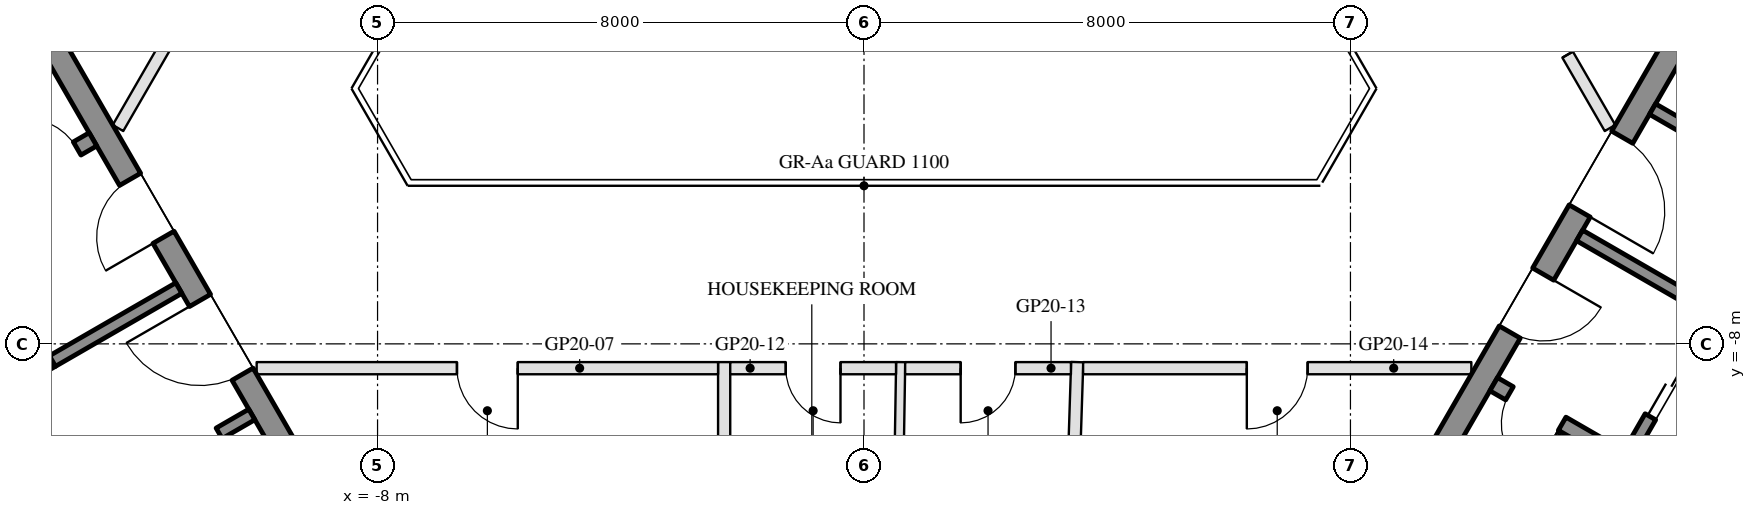
"""IFC4 building model, lengths in metres.
Left out: names, types, materials, properties, quantities, classifications, styles, units other than length and angle.
Written with IfcOpenShell. Run it as: python <this file> out.ifc"""

import sys

from ifc_helpers import new_model, si_unit, direction, frame, frame_2d, origin, place, context, subcontext, project, spatial, rectangle, extrude, element, fill, save


model = new_model("IFC4")
c1 = context("Model", 3, precision=1e-05, world=origin(), true_north=direction((0.0, 1.0)))
c2 = subcontext(c1, "Body", "Model", "MODEL_VIEW")
j1 = project(units=[si_unit("LENGTHUNIT", "METRE"), si_unit("PLANEANGLEUNIT", "RADIAN")], contexts=[c1])
p1 = place(None, origin())
s1 = spatial("IfcSite", under=j1, at=p1, CompositionType="ELEMENT")
p2 = place(p1, origin())
s2 = spatial("IfcBuilding", under=s1, at=p2, CompositionType="ELEMENT")
p3 = place(p2, frame((0.0, 0.0, 209.5)))
s3 = spatial("IfcBuildingStorey", under=s2, at=p3, CompositionType="ELEMENT", Elevation=209.5)
p4 = place(p3, frame((-13.845, -2.22, 0.0), z_axis=(0.0, 0.0, 1.0), x_axis=(0.500004234368, -0.866022959057, 0.0)))
e1 = element("IfcWall", 1, at=p4, inside=s3, PredefinedType="SHEAR", context=c2, shape_type="SweptSolid", body=[
    extrude(rectangle(XDim=10.0, YDim=0.4, at=frame_2d((5.0, 0.0))), origin(), (0.0, 0.0, 1.0), 3.5),
])
p5 = place(p4, frame((3.55, 0.0, 0.0)))
e2 = element("IfcOpeningElement", 2, at=p5, cuts=e1, PredefinedType="OPENING", context=c2, shape_type="SweptSolid", body=[
    extrude(rectangle(XDim=1.1, YDim=2.1, at=frame_2d((0.55, 1.05))), frame((0.0, 0.21, 0.0), z_axis=(0.0, -1.0, 0.0), x_axis=(1.0, 0.0, 0.0)), (0.0, 0.0, 1.0), 0.42),
])
p6 = place(p4, frame((5.85, 0.0, 0.0)))
e3 = element("IfcOpeningElement", 3, at=p6, cuts=e1, PredefinedType="OPENING", context=c2, shape_type="SweptSolid", body=[
    extrude(rectangle(XDim=1.4, YDim=2.1, at=frame_2d((0.7, 1.05))), frame((0.0, 0.21, 0.0), z_axis=(0.0, -1.0, 0.0), x_axis=(1.0, 0.0, 0.0)), (0.0, 0.0, 1.0), 0.42),
])
p7 = place(p3, frame((-12.681, -4.636, 0.0), z_axis=(0.0, 0.0, 1.0), x_axis=(-0.866021702275, -0.500006411147, 0.0)))
e4 = element("IfcWall", 4, at=p7, inside=s3, PredefinedType="SHEAR", context=c2, shape_type="SweptSolid", body=[
    extrude(rectangle(XDim=6.45, YDim=0.25, at=frame_2d((3.225, 0.0))), origin(), (0.0, 0.0, 1.0), 3.5),
])
p8 = place(p7, frame((0.3, 0.0, 0.0)))
e5 = element("IfcOpeningElement", 5, at=p8, cuts=e4, PredefinedType="OPENING", context=c2, shape_type="SweptSolid", body=[
    extrude(rectangle(XDim=1.0, YDim=2.1, at=frame_2d((0.5, 1.05))), frame((0.0, 0.135, 0.0), z_axis=(0.0, -1.0, 0.0), x_axis=(1.0, 0.0, 0.0)), (0.0, 0.0, 1.0), 0.27),
])
p9 = place(p3, frame((-14.783, -5.995, 0.0), z_axis=(0.0, 0.0, 1.0), x_axis=(0.49994636267, -0.866056369097, 0.0)))
e6 = element("IfcWall", 6, at=p9, inside=s3, PredefinedType="SHEAR", context=c2, shape_type="SweptSolid", body=[
    extrude(rectangle(XDim=2.8, YDim=0.2, at=frame_2d((1.4, 0.0))), origin(), (0.0, 0.0, 1.0), 3.5),
])
p10 = place(p9, frame((0.7, 0.0, 0.0)))
e7 = element("IfcOpeningElement", 7, at=p10, cuts=e6, PredefinedType="OPENING", context=c2, shape_type="SweptSolid", body=[
    extrude(rectangle(XDim=1.2, YDim=2.1, at=frame_2d((0.6, 1.05))), frame((0.0, 0.11, 0.0), z_axis=(0.0, -1.0, 0.0), x_axis=(1.0, 0.0, 0.0)), (0.0, 0.0, 1.0), 0.22),
])
p11 = place(p3, frame((-11.268, -7.083, 0.0), z_axis=(0.0, 0.0, 1.0), x_axis=(-0.866050077142, -0.499957262057, 0.0)))
e8 = element("IfcWall", 8, at=p11, inside=s3, PredefinedType="SHEAR", context=c2, shape_type="SweptSolid", body=[
    extrude(rectangle(XDim=2.4, YDim=0.2, at=frame_2d((1.2, 0.0))), origin(), (0.0, 0.0, 1.0), 3.5),
])
p12 = place(p3, frame((-10.068, -9.162, 0.0), z_axis=(0.0, 0.0, 1.0), x_axis=(-0.866032725843, -0.499987317609, 0.0)))
e9 = element("IfcWall", 9, at=p12, inside=s3, PredefinedType="SHEAR", context=c2, shape_type="SweptSolid", body=[
    extrude(rectangle(XDim=10.16, YDim=0.2, at=frame_2d((5.08, 0.0))), origin(), (0.0, 0.0, 1.0), 3.5),
])
p13 = place(p12, frame((0.62, 0.0, 0.0)))
e10 = element("IfcOpeningElement", 10, at=p13, cuts=e9, PredefinedType="OPENING", context=c2, shape_type="SweptSolid", body=[
    extrude(rectangle(XDim=1.1, YDim=2.1, at=frame_2d((0.55, 1.05))), frame((0.0, 0.11, 0.0), z_axis=(0.0, -1.0, 0.0), x_axis=(1.0, 0.0, 0.0)), (0.0, 0.0, 1.0), 0.22),
])
p14 = place(p12, frame((3.16, 0.0, 0.0)))
e11 = element("IfcOpeningElement", 11, at=p14, cuts=e9, PredefinedType="OPENING", context=c2, shape_type="SweptSolid", body=[
    extrude(rectangle(XDim=1.1, YDim=2.1, at=frame_2d((0.55, 1.05))), frame((0.0, 0.11, 0.0), z_axis=(0.0, -1.0, 0.0), x_axis=(1.0, 0.0, 0.0)), (0.0, 0.0, 1.0), 0.22),
])
p15 = place(p12, frame((5.7, 0.0, 0.0)))
e12 = element("IfcOpeningElement", 12, at=p15, cuts=e9, PredefinedType="OPENING", context=c2, shape_type="SweptSolid", body=[
    extrude(rectangle(XDim=1.1, YDim=2.1, at=frame_2d((0.55, 1.05))), frame((0.0, 0.11, 0.0), z_axis=(0.0, -1.0, 0.0), x_axis=(1.0, 0.0, 0.0)), (0.0, 0.0, 1.0), 0.22),
])
p16 = place(p12, frame((8.24, 0.0, 0.0)))
e13 = element("IfcOpeningElement", 13, at=p16, cuts=e9, PredefinedType="OPENING", context=c2, shape_type="SweptSolid", body=[
    extrude(rectangle(XDim=1.1, YDim=2.1, at=frame_2d((0.55, 1.05))), frame((0.0, 0.11, 0.0), z_axis=(0.0, -1.0, 0.0), x_axis=(1.0, 0.0, 0.0)), (0.0, 0.0, 1.0), 0.22),
])
p17 = place(p3, frame((8.845, -10.88, 0.0), z_axis=(0.0, 0.0, 1.0), x_axis=(0.500004234368, 0.866022959057, 0.0)))
e14 = element("IfcWall", 14, at=p17, inside=s3, PredefinedType="SHEAR", context=c2, shape_type="SweptSolid", body=[
    extrude(rectangle(XDim=10.0, YDim=0.4, at=frame_2d((5.0, 0.0))), origin(), (0.0, 0.0, 1.0), 3.5),
])
p18 = place(p17, frame((3.55, 0.0, 0.0)))
e15 = element("IfcOpeningElement", 15, at=p18, cuts=e14, PredefinedType="OPENING", context=c2, shape_type="SweptSolid", body=[
    extrude(rectangle(XDim=1.1, YDim=2.1, at=frame_2d((0.55, 1.05))), frame((0.0, 0.21, 0.0), z_axis=(0.0, -1.0, 0.0), x_axis=(1.0, 0.0, 0.0)), (0.0, 0.0, 1.0), 0.42),
])
p19 = place(p17, frame((5.85, 0.0, 0.0)))
e16 = element("IfcOpeningElement", 16, at=p19, cuts=e14, PredefinedType="OPENING", context=c2, shape_type="SweptSolid", body=[
    extrude(rectangle(XDim=1.4, YDim=2.1, at=frame_2d((0.7, 1.05))), frame((0.0, 0.21, 0.0), z_axis=(0.0, -1.0, 0.0), x_axis=(1.0, 0.0, 0.0)), (0.0, 0.0, 1.0), 0.42),
])
p20 = place(p3, frame((10.356, -8.664, 0.0), z_axis=(0.0, 0.0, 1.0), x_axis=(0.866028629588, -0.499994412703, 0.0)))
e17 = element("IfcWall", 17, at=p20, inside=s3, PredefinedType="SHEAR", context=c2, shape_type="SweptSolid", body=[
    extrude(rectangle(XDim=6.45, YDim=0.25, at=frame_2d((3.225, 0.0))), origin(), (0.0, 0.0, 1.0), 3.5),
])
p21 = place(p20, frame((0.3, 0.0, 0.0)))
e18 = element("IfcOpeningElement", 18, at=p21, cuts=e17, PredefinedType="OPENING", context=c2, shape_type="SweptSolid", body=[
    extrude(rectangle(XDim=1.0, YDim=2.1, at=frame_2d((0.5, 1.05))), frame((0.0, 0.135, 0.0), z_axis=(0.0, -1.0, 0.0), x_axis=(1.0, 0.0, 0.0)), (0.0, 0.0, 1.0), 0.27),
])
p22 = place(p3, frame((12.583, -9.805, 0.0), z_axis=(0.0, 0.0, 1.0), x_axis=(0.49994636267, 0.866056369097, 0.0)))
e19 = element("IfcWall", 19, at=p22, inside=s3, PredefinedType="SHEAR", context=c2, shape_type="SweptSolid", body=[
    extrude(rectangle(XDim=2.8, YDim=0.2, at=frame_2d((1.4, 0.0))), origin(), (0.0, 0.0, 1.0), 3.5),
])
p23 = place(p22, frame((0.7, 0.0, 0.0)))
e20 = element("IfcOpeningElement", 20, at=p23, cuts=e19, PredefinedType="OPENING", context=c2, shape_type="SweptSolid", body=[
    extrude(rectangle(XDim=1.2, YDim=2.1, at=frame_2d((0.6, 1.05))), frame((0.0, 0.11, 0.0), z_axis=(0.0, -1.0, 0.0), x_axis=(1.0, 0.0, 0.0)), (0.0, 0.0, 1.0), 0.22),
])
p24 = place(p3, frame((11.768, -6.217, 0.0), z_axis=(0.0, 0.0, 1.0), x_axis=(0.866050077142, -0.499957262057, 0.0)))
e21 = element("IfcWall", 21, at=p24, inside=s3, PredefinedType="SHEAR", context=c2, shape_type="SweptSolid", body=[
    extrude(rectangle(XDim=2.4, YDim=0.2, at=frame_2d((1.2, 0.0))), origin(), (0.0, 0.0, 1.0), 3.5),
])
p25 = place(p3, frame((12.968, -4.138, 0.0), z_axis=(0.0, 0.0, 1.0), x_axis=(0.866028328073, -0.49999493495, 0.0)))
e22 = element("IfcWall", 22, at=p25, inside=s3, PredefinedType="SHEAR", context=c2, shape_type="SweptSolid", body=[
    extrude(rectangle(XDim=10.16, YDim=0.2, at=frame_2d((5.08, 0.0))), origin(), (0.0, 0.0, 1.0), 3.5),
])
p26 = place(p25, frame((0.72, 0.0, 0.0)))
e23 = element("IfcOpeningElement", 23, at=p26, cuts=e22, PredefinedType="OPENING", context=c2, shape_type="SweptSolid", body=[
    extrude(rectangle(XDim=0.9, YDim=2.1, at=frame_2d((0.45, 1.05))), frame((0.0, 0.11, 0.0), z_axis=(0.0, -1.0, 0.0), x_axis=(1.0, 0.0, 0.0)), (0.0, 0.0, 1.0), 0.22),
])
p27 = place(p25, frame((5.8, 0.0, 0.0)))
e24 = element("IfcOpeningElement", 24, at=p27, cuts=e22, PredefinedType="OPENING", context=c2, shape_type="SweptSolid", body=[
    extrude(rectangle(XDim=0.9, YDim=2.1, at=frame_2d((0.45, 1.05))), frame((0.0, 0.11, 0.0), z_axis=(0.0, -1.0, 0.0), x_axis=(1.0, 0.0, 0.0)), (0.0, 0.0, 1.0), 0.22),
])
p28 = place(p3, frame((-2.3, -18.38, 0.0), z_axis=(0.0, 0.0, 1.0), x_axis=(0.0, 1.0, 0.0)))
e25 = element("IfcWall", 25, at=p28, inside=s3, PredefinedType="PARTITIONING", context=c2, shape_type="SweptSolid", body=[
    extrude(rectangle(XDim=10.08, YDim=0.2, at=frame_2d((5.04, 0.0))), origin(), (0.0, 0.0, 1.0), 3.06),
])
p29 = place(p3, frame((3.15, -19.28, 0.0), z_axis=(0.0, 0.0, 1.0), x_axis=(0.032468308586, 0.999472765481, 0.0)))
e26 = element("IfcWall", 26, at=p29, inside=s3, PredefinedType="PARTITIONING", context=c2, shape_type="SweptSolid", body=[
    extrude(rectangle(XDim=10.986, YDim=0.2, at=frame_2d((5.493, 0.0))), origin(), (0.0, 0.0, 1.0), 3.06),
])
p30 = place(p3, frame((-2.4, -8.4, 0.0), z_axis=(0.0, 0.0, 1.0), x_axis=(-1.0, 0.0, 0.0)))
e27 = element("IfcWall", 27, at=p30, inside=s3, PredefinedType="PARTITIONING", context=c2, shape_type="SweptSolid", body=[
    extrude(rectangle(XDim=7.588, YDim=0.2, at=frame_2d((3.794, 0.0))), origin(), (0.0, 0.0, 1.0), 2.95),
])
p31 = place(p30, frame((3.294, 0.0, 0.0)))
e28 = element("IfcOpeningElement", 28, at=p31, cuts=e27, PredefinedType="OPENING", context=c2, shape_type="SweptSolid", body=[
    extrude(rectangle(XDim=1.0, YDim=2.1, at=frame_2d((0.5, 1.05))), frame((0.0, 0.11, 0.0), z_axis=(0.0, -1.0, 0.0), x_axis=(1.0, 0.0, 0.0)), (0.0, 0.0, 1.0), 0.22),
])
p32 = place(p3, frame((0.425, -19.28, 0.0), z_axis=(0.0, 0.0, 1.0), x_axis=(0.016229462675, 0.999868293597, 0.0)))
e29 = element("IfcWall", 29, at=p32, inside=s3, PredefinedType="PARTITIONING", context=c2, shape_type="SweptSolid", body=[
    extrude(rectangle(XDim=10.981, YDim=0.15, at=frame_2d((5.491, 0.0))), origin(), (0.0, 0.0, 1.0), 3.06),
])
p33 = place(p3, frame((0.527, -8.4, 0.0), z_axis=(0.0, 0.0, 1.0), x_axis=(-1.0, 0.0, 0.0)))
e30 = element("IfcWall", 30, at=p33, inside=s3, PredefinedType="PARTITIONING", context=c2, shape_type="SweptSolid", body=[
    extrude(rectangle(XDim=2.727, YDim=0.2, at=frame_2d((1.363, 0.0))), origin(), (0.0, 0.0, 1.0), 2.95),
])
p34 = place(p33, frame((0.913, 0.0, 0.0)))
e31 = element("IfcOpeningElement", 31, at=p34, cuts=e30, PredefinedType="OPENING", context=c2, shape_type="SweptSolid", body=[
    extrude(rectangle(XDim=0.9, YDim=2.1, at=frame_2d((0.45, 1.05))), frame((0.0, 0.11, 0.0), z_axis=(0.0, -1.0, 0.0), x_axis=(1.0, 0.0, 0.0)), (0.0, 0.0, 1.0), 0.22),
])
p35 = place(p3, frame((3.403, -8.4, 0.0), z_axis=(0.0, 0.0, 1.0), x_axis=(-1.0, 0.0, 0.0)))
e32 = element("IfcWall", 32, at=p35, inside=s3, PredefinedType="PARTITIONING", context=c2, shape_type="SweptSolid", body=[
    extrude(rectangle(XDim=2.727, YDim=0.2, at=frame_2d((1.363, 0.0))), origin(), (0.0, 0.0, 1.0), 3.55),
])
p36 = place(p35, frame((0.913, 0.0, 0.0)))
e33 = element("IfcOpeningElement", 33, at=p36, cuts=e32, PredefinedType="OPENING", context=c2, shape_type="SweptSolid", body=[
    extrude(rectangle(XDim=0.9, YDim=2.1, at=frame_2d((0.45, 1.05))), frame((0.0, 0.11, 0.0), z_axis=(0.0, -1.0, 0.0), x_axis=(1.0, 0.0, 0.0)), (0.0, 0.0, 1.0), 0.22),
])
p37 = place(p3, frame((9.988, -8.4, 0.0), z_axis=(0.0, 0.0, 1.0), x_axis=(-1.0, 0.0, 0.0)))
e34 = element("IfcWall", 34, at=p37, inside=s3, PredefinedType="PARTITIONING", context=c2, shape_type="SweptSolid", body=[
    extrude(rectangle(XDim=6.385, YDim=0.2, at=frame_2d((3.192, 0.0))), origin(), (0.0, 0.0, 1.0), 2.95),
])
p38 = place(p37, frame((2.692, 0.0, 0.0)))
e35 = element("IfcOpeningElement", 35, at=p38, cuts=e34, PredefinedType="OPENING", context=c2, shape_type="SweptSolid", body=[
    extrude(rectangle(XDim=1.0, YDim=2.1, at=frame_2d((0.5, 1.05))), frame((0.0, 0.11, 0.0), z_axis=(0.0, -1.0, 0.0), x_axis=(1.0, 0.0, 0.0)), (0.0, 0.0, 1.0), 0.22),
])
p39 = place(p3, frame((10.375, -1.169, 0.0), z_axis=(0.0, 0.0, 1.0), x_axis=(0.500055316652, -0.865993464345, 0.0)))
e36 = element("IfcWall", 36, at=p39, inside=s3, PredefinedType="PARTITIONING", context=c2, shape_type="SweptSolid", body=[
    extrude(rectangle(XDim=3.788, YDim=0.2, at=frame_2d((1.894, 0.0))), origin(), (0.0, 0.0, 1.0), 2.95),
])
p40 = place(p39, frame((1.394, 0.0, 0.0)))
e37 = element("IfcOpeningElement", 37, at=p40, cuts=e36, PredefinedType="OPENING", context=c2, shape_type="SweptSolid", body=[
    extrude(rectangle(XDim=1.0, YDim=2.1, at=frame_2d((0.5, 1.05))), frame((0.0, 0.11, 0.0), z_axis=(0.0, -1.0, 0.0), x_axis=(1.0, 0.0, 0.0)), (0.0, 0.0, 1.0), 0.22),
])
p41 = place(p3, frame((-12.269, -4.45, 0.0), z_axis=(0.0, 0.0, 1.0), x_axis=(0.500014573982, 0.866016989329, 0.0)))
e38 = element("IfcWall", 38, at=p41, inside=s3, PredefinedType="PARTITIONING", context=c2, shape_type="SweptSolid", body=[
    extrude(rectangle(XDim=5.088, YDim=0.2, at=frame_2d((2.544, 0.0))), origin(), (0.0, 0.0, 1.0), 2.95),
])
p42 = place(p41, frame((2.044, 0.0, 0.0)))
e39 = element("IfcOpeningElement", 39, at=p42, cuts=e38, PredefinedType="OPENING", context=c2, shape_type="SweptSolid", body=[
    extrude(rectangle(XDim=1.0, YDim=2.1, at=frame_2d((0.5, 1.05))), frame((0.0, 0.11, 0.0), z_axis=(0.0, -1.0, 0.0), x_axis=(1.0, 0.0, 0.0)), (0.0, 0.0, 1.0), 0.22),
])
p43 = place(p13, origin())
e40 = element("IfcDoor", 40, at=p43, inside=s3, OperationType="DOUBLE_DOOR_SLIDING", PredefinedType="DOOR", context=c2, shape_type="SweptSolid", body=[
    extrude(rectangle(XDim=1.1, YDim=2.1, at=frame_2d((0.55, 1.05))), frame((0.0, 0.025, 0.0), z_axis=(0.0, -1.0, 0.0), x_axis=(1.0, 0.0, 0.0)), (0.0, 0.0, 1.0), 0.05),
])
fill(e10, e40)
p44 = place(p5, frame((1.1, 0.0, 0.0), z_axis=(0.0, 0.0, 1.0), x_axis=(-1.0, 0.0, 0.0)))
e41 = element("IfcDoor", 41, at=p44, inside=s3, OperationType="SINGLE_SWING_LEFT", PredefinedType="DOOR", context=c2, shape_type="SweptSolid", body=[
    extrude(rectangle(XDim=1.1, YDim=2.1, at=frame_2d((0.55, 1.05))), frame((0.0, 0.025, 0.0), z_axis=(0.0, -1.0, 0.0), x_axis=(1.0, 0.0, 0.0)), (0.0, 0.0, 1.0), 0.05),
])
fill(e2, e41)
p45 = place(p6, frame((1.4, 0.0, 0.0), z_axis=(0.0, 0.0, 1.0), x_axis=(-1.0, 0.0, 0.0)))
e42 = element("IfcDoor", 42, at=p45, inside=s3, OperationType="DOUBLE_DOOR_SINGLE_SWING", PredefinedType="DOOR", context=c2, shape_type="SweptSolid", body=[
    extrude(rectangle(XDim=1.4, YDim=2.1, at=frame_2d((0.7, 1.05))), frame((0.0, 0.025, 0.0), z_axis=(0.0, -1.0, 0.0), x_axis=(1.0, 0.0, 0.0)), (0.0, 0.0, 1.0), 0.05),
])
fill(e3, e42)
p46 = place(p8, frame((1.0, 0.0, 0.0), z_axis=(0.0, 0.0, 1.0), x_axis=(-1.0, 0.0, 0.0)))
e43 = element("IfcDoor", 43, at=p46, inside=s3, OperationType="SINGLE_SWING_LEFT", PredefinedType="DOOR", context=c2, shape_type="SweptSolid", body=[
    extrude(rectangle(XDim=1.0, YDim=2.1, at=frame_2d((0.5, 1.05))), frame((0.0, 0.025, 0.0), z_axis=(0.0, -1.0, 0.0), x_axis=(1.0, 0.0, 0.0)), (0.0, 0.0, 1.0), 0.05),
])
fill(e5, e43)
p47 = place(p23, origin())
e44 = element("IfcDoor", 44, at=p47, inside=s3, OperationType="DOUBLE_DOOR_SLIDING", PredefinedType="DOOR", context=c2, shape_type="SweptSolid", body=[
    extrude(rectangle(XDim=1.2, YDim=2.1, at=frame_2d((0.6, 1.05))), frame((0.0, 0.025, 0.0), z_axis=(0.0, -1.0, 0.0), x_axis=(1.0, 0.0, 0.0)), (0.0, 0.0, 1.0), 0.05),
])
fill(e20, e44)
p48 = place(p18, frame((1.1, 0.0, 0.0), z_axis=(0.0, 0.0, 1.0), x_axis=(-1.0, 0.0, 0.0)))
e45 = element("IfcDoor", 45, at=p48, inside=s3, OperationType="SINGLE_SWING_LEFT", PredefinedType="DOOR", context=c2, shape_type="SweptSolid", body=[
    extrude(rectangle(XDim=1.1, YDim=2.1, at=frame_2d((0.55, 1.05))), frame((0.0, 0.025, 0.0), z_axis=(0.0, -1.0, 0.0), x_axis=(1.0, 0.0, 0.0)), (0.0, 0.0, 1.0), 0.05),
])
fill(e15, e45)
p49 = place(p19, frame((1.4, 0.0, 0.0), z_axis=(0.0, 0.0, 1.0), x_axis=(-1.0, 0.0, 0.0)))
e46 = element("IfcDoor", 46, at=p49, inside=s3, OperationType="DOUBLE_DOOR_SINGLE_SWING", PredefinedType="DOOR", context=c2, shape_type="SweptSolid", body=[
    extrude(rectangle(XDim=1.4, YDim=2.1, at=frame_2d((0.7, 1.05))), frame((0.0, 0.025, 0.0), z_axis=(0.0, -1.0, 0.0), x_axis=(1.0, 0.0, 0.0)), (0.0, 0.0, 1.0), 0.05),
])
fill(e16, e46)
p50 = place(p21, frame((1.0, 0.0, 0.0), z_axis=(0.0, 0.0, 1.0), x_axis=(-1.0, 0.0, 0.0)))
e47 = element("IfcDoor", 47, at=p50, inside=s3, OperationType="SINGLE_SWING_LEFT", PredefinedType="DOOR", context=c2, shape_type="SweptSolid", body=[
    extrude(rectangle(XDim=1.0, YDim=2.1, at=frame_2d((0.5, 1.05))), frame((0.0, 0.025, 0.0), z_axis=(0.0, -1.0, 0.0), x_axis=(1.0, 0.0, 0.0)), (0.0, 0.0, 1.0), 0.05),
])
fill(e18, e47)
p51 = place(p31, origin())
e48 = element("IfcDoor", 48, at=p51, inside=s3, OperationType="SINGLE_SWING_LEFT", PredefinedType="DOOR", context=c2, shape_type="SweptSolid", body=[
    extrude(rectangle(XDim=1.0, YDim=2.1, at=frame_2d((0.5, 1.05))), frame((0.0, 0.025, 0.0), z_axis=(0.0, -1.0, 0.0), x_axis=(1.0, 0.0, 0.0)), (0.0, 0.0, 1.0), 0.05),
])
fill(e28, e48)
p52 = place(p34, origin())
e49 = element("IfcDoor", 49, at=p52, inside=s3, OperationType="SINGLE_SWING_LEFT", PredefinedType="DOOR", context=c2, shape_type="SweptSolid", body=[
    extrude(rectangle(XDim=0.9, YDim=2.1, at=frame_2d((0.45, 1.05))), frame((0.0, 0.025, 0.0), z_axis=(0.0, -1.0, 0.0), x_axis=(1.0, 0.0, 0.0)), (0.0, 0.0, 1.0), 0.05),
])
fill(e31, e49)
p53 = place(p36, origin())
e50 = element("IfcDoor", 50, at=p53, inside=s3, OperationType="SINGLE_SWING_RIGHT", PredefinedType="DOOR", context=c2, shape_type="SweptSolid", body=[
    extrude(rectangle(XDim=0.9, YDim=2.1, at=frame_2d((0.45, 1.05))), frame((0.0, 0.025, 0.0), z_axis=(0.0, -1.0, 0.0), x_axis=(1.0, 0.0, 0.0)), (0.0, 0.0, 1.0), 0.05),
])
fill(e33, e50)
p54 = place(p38, origin())
e51 = element("IfcDoor", 51, at=p54, inside=s3, OperationType="SINGLE_SWING_RIGHT", PredefinedType="DOOR", context=c2, shape_type="SweptSolid", body=[
    extrude(rectangle(XDim=1.0, YDim=2.1, at=frame_2d((0.5, 1.05))), frame((0.0, 0.025, 0.0), z_axis=(0.0, -1.0, 0.0), x_axis=(1.0, 0.0, 0.0)), (0.0, 0.0, 1.0), 0.05),
])
fill(e35, e51)
p55 = place(p40, origin())
e52 = element("IfcDoor", 52, at=p55, inside=s3, OperationType="SINGLE_SWING_LEFT", PredefinedType="DOOR", context=c2, shape_type="SweptSolid", body=[
    extrude(rectangle(XDim=1.0, YDim=2.1, at=frame_2d((0.5, 1.05))), frame((0.0, 0.025, 0.0), z_axis=(0.0, -1.0, 0.0), x_axis=(1.0, 0.0, 0.0)), (0.0, 0.0, 1.0), 0.05),
])
fill(e37, e52)
save(model, sys.argv[1])
